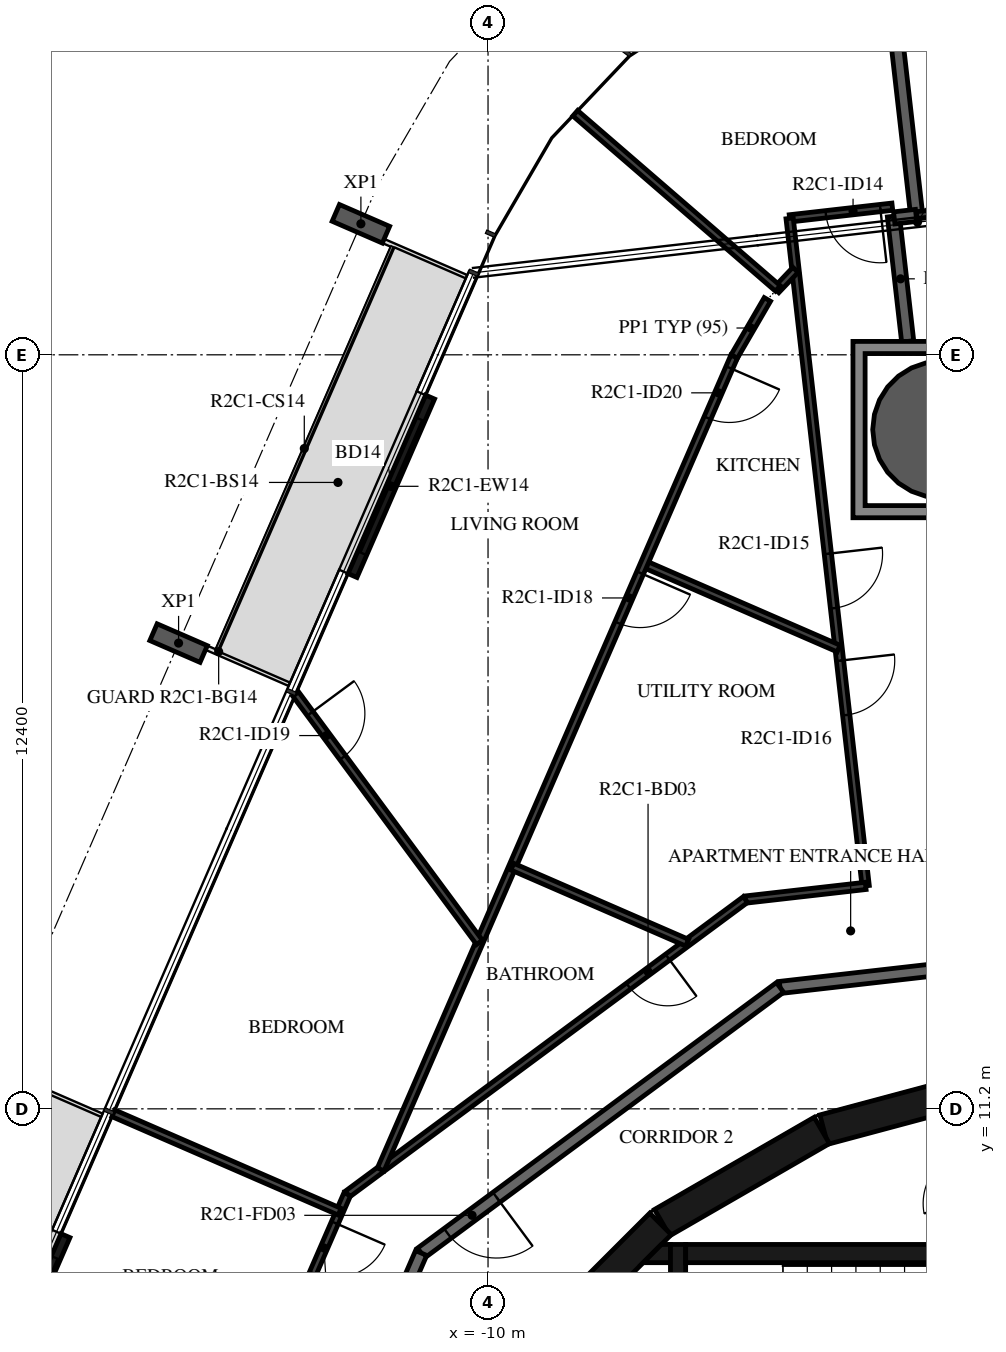
"""IFC4 building model, lengths in metres.
Left out: names, types, materials, properties, quantities, classifications, styles, units other than length and angle.
Written with IfcOpenShell. Run it as: python <this file> out.ifc"""

import sys

from ifc_helpers import new_model, si_unit, direction, frame, frame_2d, origin, origin_2d, place, context, subcontext, project, spatial, polyline, rectangle, hollow_circle, i_section, outline, extrude, element, fill, save


model = new_model("IFC4")
c1 = context("Model", 3, precision=1e-05, world=origin(), true_north=direction((0.0, 1.0)))
c2 = subcontext(c1, "Body", "Model", "MODEL_VIEW")
j1 = project(units=[si_unit("LENGTHUNIT", "METRE"), si_unit("PLANEANGLEUNIT", "RADIAN")], contexts=[c1])
p1 = place(None, origin())
s1 = spatial("IfcSite", under=j1, at=p1, CompositionType="ELEMENT")
p2 = place(p1, origin())
s2 = spatial("IfcBuilding", under=s1, at=p2, CompositionType="ELEMENT")
p3 = place(p2, frame((0.0, 0.0, 101.2)))
s3 = spatial("IfcBuildingStorey", under=s2, at=p3, CompositionType="ELEMENT", Elevation=101.2)
p4 = place(p3, frame((-2.549, 22.37, -0.38), z_axis=(0.0, 0.0, 1.0), x_axis=(1.0, 0.0, 0.0)))
e1 = element("IfcColumn", 1, at=p4, inside=s3, PredefinedType="COLUMN", context=c2, shape_type="SweptSolid", body=[
    extrude(hollow_circle(Radius=1.125, WallThickness=0.055, at=origin_2d()), origin(), (0.0, 0.0, 1.0), 3.5),
])
for number, where, z_axis, x_axis in (
    (2, (-12.091, 25.754, -0.38), (0.0, 0.0, 1.0), (0.399, 0.917, 0.0)),
    (3, (-15.089, 18.859, -0.38), (0.0, 0.0, 1.0), (0.399, 0.917, 0.0)),
):
    element("IfcColumn", number, at=place(p3, frame(where, z_axis=z_axis, x_axis=x_axis)), inside=s3, PredefinedType="COLUMN", context=c2, shape_type="SweptSolid", body=[
        extrude(i_section(OverallWidth=0.3, OverallDepth=0.9, WebThickness=0.019, FlangeThickness=0.035, FilletRadius=0.03, at=origin_2d()), origin(), (0.0, 0.0, 1.0), 3.5),
    ])
p5 = place(p3, frame((-10.953, 22.905, 0.0), z_axis=(0.0, 0.0, 1.0), x_axis=(-0.398784695066, -0.917044582876, 0.0)))
e4 = element("IfcWall", 4, at=p5, inside=s3, PredefinedType="STANDARD", context=c2, shape_type="SweptSolid", body=[
    extrude(rectangle(XDim=3.2, YDim=0.16, at=frame_2d((1.6, 0.0))), origin(), (0.0, 0.0, 1.0), 3.12),
])
p6 = place(p5, frame((0.4, 0.0, 0.0)))
e5 = element("IfcOpeningElement", 5, at=p6, cuts=e4, PredefinedType="OPENING", context=c2, shape_type="SweptSolid", body=[
    extrude(rectangle(XDim=2.4, YDim=2.4, at=frame_2d((1.2, 1.2))), frame((0.0, 0.09, 0.0), z_axis=(0.0, -1.0, 0.0), x_axis=(1.0, 0.0, 0.0)), (0.0, 0.0, 1.0), 0.18),
])
p7 = place(p3, frame((-16.949, 9.114, 0.0), z_axis=(0.0, 0.0, 1.0), x_axis=(-0.398720531764, -0.917072482168, 0.0)))
e6 = element("IfcWall", 6, at=p7, inside=s3, PredefinedType="STANDARD", context=c2, shape_type="SweptSolid", body=[
    extrude(rectangle(XDim=3.2, YDim=0.16, at=frame_2d((1.6, 0.0))), origin(), (0.0, 0.0, 1.0), 3.12),
])
p8 = place(p7, frame((0.4, 0.0, 0.0)))
e7 = element("IfcOpeningElement", 7, at=p8, cuts=e6, PredefinedType="OPENING", context=c2, shape_type="SweptSolid", body=[
    extrude(rectangle(XDim=2.4, YDim=2.4, at=frame_2d((1.2, 1.2))), frame((0.0, 0.09, 0.0), z_axis=(0.0, -1.0, 0.0), x_axis=(1.0, 0.0, 0.0)), (0.0, 0.0, 1.0), 0.18),
])
for number, where, z_axis, x_axis in (
    (8, (-1.55, 11.643, 0.0), (0.0, 0.0, 1.0), (-0.966, -0.259, 0.0)),
    (9, (-4.51, 10.845, 0.0), (0.0, 0.0, 1.0), (-0.866, -0.5, 0.0)),
):
    element("IfcWall", number, at=place(p3, frame(where, z_axis=z_axis, x_axis=x_axis)), inside=s3, PredefinedType="SHEAR", context=c2, shape_type="SweptSolid", body=[
        extrude(rectangle(XDim=3.033, YDim=0.5, at=frame_2d((1.516, 0.0))), origin(), (0.0, 0.0, 1.0), 3.12),
    ])
p9 = place(p3, frame((-7.164, 9.308, 0.0), z_axis=(0.0, 0.0, 1.0), x_axis=(-0.707106781187, -0.707106781187, 0.0)))
e10 = element("IfcWall", 10, at=p9, inside=s3, PredefinedType="SHEAR", context=c2, shape_type="SweptSolid", body=[
    extrude(rectangle(XDim=3.032, YDim=0.5, at=frame_2d((1.516, 0.0))), origin(), (0.0, 0.0, 1.0), 3.12),
])
p10 = place(p9, frame((1.416, 0.0, 0.0)))
e11 = element("IfcOpeningElement", 11, at=p10, cuts=e10, PredefinedType="OPENING", context=c2, shape_type="SweptSolid", body=[
    extrude(rectangle(XDim=1.2, YDim=2.1, at=frame_2d((0.6, 1.05))), frame((0.0, 0.26, 0.0), z_axis=(0.0, -1.0, 0.0), x_axis=(1.0, 0.0, 0.0)), (0.0, 0.0, 1.0), 0.52),
])
p11 = place(p3, frame((-6.75, 8.82, 0.0), z_axis=(0.0, 0.0, 1.0), x_axis=(1.0, 0.0, 0.0)))
e12 = element("IfcWall", 12, at=p11, inside=s3, PredefinedType="SHEAR", context=c2, shape_type="SweptSolid", body=[
    extrude(rectangle(XDim=6.75, YDim=0.3, at=frame_2d((3.375, 0.0))), origin(), (0.0, 0.0, 1.0), 3.12),
])
p12 = place(p3, frame((-6.875, 8.97, 0.0), z_axis=(0.0, 0.0, 1.0), x_axis=(0.0, -1.0, 0.0)))
e13 = element("IfcWall", 13, at=p12, inside=s3, PredefinedType="SHEAR", context=c2, shape_type="SweptSolid", body=[
    extrude(rectangle(XDim=3.92, YDim=0.25, at=frame_2d((1.96, 0.0))), origin(), (0.0, 0.0, 1.0), 3.12),
])
p13 = place(p12, frame((1.61, 0.0, 0.0)))
e14 = element("IfcOpeningElement", 14, at=p13, cuts=e13, PredefinedType="OPENING", context=c2, shape_type="SweptSolid", body=[
    extrude(rectangle(XDim=1.2, YDim=2.1, at=frame_2d((0.6, 1.05))), frame((0.0, 0.135, 0.0), z_axis=(0.0, -1.0, 0.0), x_axis=(1.0, 0.0, 0.0)), (0.0, 0.0, 1.0), 0.27),
])
p14 = place(p3, origin())
e15 = element("IfcWall", 15, at=p14, inside=s3, PredefinedType="SHEAR", context=c2, shape_type="SweptSolid", body=[
    extrude(outline(polyline([(-7.148, 8.97), (-7.0, 8.97), (-7.0, 8.67), (-7.448, 8.67), (-7.148, 8.97)])), origin(), (0.0, 0.0, 1.0), 3.12),
])
p15 = place(p3, frame((2.096, 14.028, 0.0), z_axis=(0.0, 0.0, 1.0), x_axis=(-0.993569170114, -0.113226782163, 0.0)))
e16 = element("IfcWall", 16, at=p15, inside=s3, PredefinedType="STANDARD", context=c2, shape_type="SweptSolid", body=[
    extrude(rectangle(XDim=7.342, YDim=0.2, at=frame_2d((3.671, 0.0))), origin(), (0.0, 0.0, 1.0), 3.12),
])
p16 = place(p3, frame((-5.198, 13.196, 0.0), z_axis=(0.0, 0.0, 1.0), x_axis=(-0.803869883159, -0.594805187394, 0.0)))
e17 = element("IfcWall", 17, at=p16, inside=s3, PredefinedType="STANDARD", context=c2, shape_type="SweptSolid", body=[
    extrude(rectangle(XDim=7.342, YDim=0.2, at=frame_2d((3.671, 0.0))), origin(), (0.0, 0.0, 1.0), 3.12),
])
p17 = place(p16, frame((5.8, 0.0, 0.0)))
e18 = element("IfcOpeningElement", 18, at=p17, cuts=e17, PredefinedType="OPENING", context=c2, shape_type="SweptSolid", body=[
    extrude(rectangle(XDim=1.0, YDim=2.1, at=frame_2d((0.5, 1.05))), frame((0.0, 0.11, 0.0), z_axis=(0.0, -1.0, 0.0), x_axis=(1.0, 0.0, 0.0)), (0.0, 0.0, 1.0), 0.22),
])
p18 = place(p3, frame((-11.1, 8.829, 0.0), z_axis=(0.0, 0.0, 1.0), x_axis=(-0.398741918631, -0.917063183388, 0.0)))
e19 = element("IfcWall", 19, at=p18, inside=s3, PredefinedType="STANDARD", context=c2, shape_type="SweptSolid", body=[
    extrude(rectangle(XDim=7.342, YDim=0.2, at=frame_2d((3.671, 0.0))), origin(), (0.0, 0.0, 1.0), 3.12),
])
p19 = place(p3, frame((-3.448, 30.265, 0.0), z_axis=(0.0, 0.0, 1.0), x_axis=(0.113189797494, -0.993573384176, 0.0)))
e20 = element("IfcWall", 20, at=p19, inside=s3, PredefinedType="STANDARD", context=c2, shape_type="SweptSolid", body=[
    extrude(rectangle(XDim=4.4, YDim=0.2, at=frame_2d((2.2, 0.0))), origin(), (0.0, 0.0, 1.0), 3.12),
])
p20 = place(p3, frame((-3.333, 25.879, 0.0), z_axis=(0.0, 0.0, 1.0), x_axis=(0.113250782095, -0.993566434797, 0.0)))
e21 = element("IfcWall", 21, at=p20, inside=s3, PredefinedType="STANDARD", context=c2, shape_type="SweptSolid", body=[
    extrude(rectangle(XDim=2.072, YDim=0.2, at=frame_2d((1.036, 0.0))), origin(), (0.0, 0.0, 1.0), 3.12),
])
p21 = place(p3, frame((-2.96, 25.892, 0.0), z_axis=(0.0, 0.0, 1.0), x_axis=(-0.993567388358, -0.113242416041, 0.0)))
e22 = element("IfcWall", 22, at=p21, inside=s3, PredefinedType="STANDARD", context=c2, shape_type="SweptSolid", body=[
    extrude(rectangle(XDim=0.362, YDim=0.2, at=frame_2d((0.181, 0.0))), origin(), (0.0, 0.0, 1.0), 3.12),
])
p22 = place(p3, frame((-2.95, 25.893, 0.0), z_axis=(0.0, 0.0, 1.0), x_axis=(0.993519378224, 0.113662857141, 0.0)))
e23 = element("IfcWall", 23, at=p22, inside=s3, PredefinedType="PARTITIONING", context=c2, shape_type="SweptSolid", body=[
    extrude(rectangle(XDim=0.415, YDim=0.12, at=frame_2d((0.207, 0.0))), origin(), (0.0, 0.0, 1.0), 3.12),
])
p23 = place(p3, frame((-3.351, 26.036, 0.0), z_axis=(0.0, 0.0, 1.0), x_axis=(-0.993575191649, -0.113173930474, 0.0)))
e24 = element("IfcWall", 24, at=p23, inside=s3, PredefinedType="PARTITIONING", context=c2, shape_type="SweptSolid", body=[
    extrude(rectangle(XDim=1.7, YDim=0.12, at=frame_2d((0.85, 0.0))), origin(), (0.0, 0.0, 1.0), 3.12),
])
p24 = place(p23, frame((0.2, 0.0, 0.0)))
e25 = element("IfcOpeningElement", 25, at=p24, cuts=e24, PredefinedType="OPENING", context=c2, shape_type="SweptSolid", body=[
    extrude(rectangle(XDim=0.9, YDim=2.1, at=frame_2d((0.45, 1.05))), frame((0.0, 0.07, 0.0), z_axis=(0.0, -1.0, 0.0), x_axis=(1.0, 0.0, 0.0)), (0.0, 0.0, 1.0), 0.14),
])
p25 = place(p3, frame((-5.04, 25.844, 0.0), z_axis=(0.0, 0.0, 1.0), x_axis=(0.1132106553, -0.993571007793, 0.0)))
e26 = element("IfcWall", 26, at=p25, inside=s3, PredefinedType="PARTITIONING", context=c2, shape_type="SweptSolid", body=[
    extrude(rectangle(XDim=11.048, YDim=0.12, at=frame_2d((5.524, 0.0))), origin(), (0.0, 0.0, 1.0), 3.12),
])
p26 = place(p25, frame((5.551, 0.0, 0.0)))
e27 = element("IfcOpeningElement", 27, at=p26, cuts=e26, PredefinedType="OPENING", context=c2, shape_type="SweptSolid", body=[
    extrude(rectangle(XDim=0.9, YDim=2.1, at=frame_2d((0.45, 1.05))), frame((0.0, 0.07, 0.0), z_axis=(0.0, -1.0, 0.0), x_axis=(1.0, 0.0, 0.0)), (0.0, 0.0, 1.0), 0.14),
])
p27 = place(p25, frame((7.32, 0.0, 0.0)))
e28 = element("IfcOpeningElement", 28, at=p27, cuts=e26, PredefinedType="OPENING", context=c2, shape_type="SweptSolid", body=[
    extrude(rectangle(XDim=0.9, YDim=2.1, at=frame_2d((0.45, 1.05))), frame((0.0, 0.07, 0.0), z_axis=(0.0, -1.0, 0.0), x_axis=(1.0, 0.0, 0.0)), (0.0, 0.0, 1.0), 0.14),
])
p28 = place(p3, frame((-3.79, 14.867, 0.0), z_axis=(0.0, 0.0, 1.0), x_axis=(-0.993557948123, -0.113325212204, 0.0)))
e29 = element("IfcWall", 29, at=p28, inside=s3, PredefinedType="PARTITIONING", context=c2, shape_type="SweptSolid", body=[
    extrude(rectangle(XDim=1.991, YDim=0.12, at=frame_2d((0.995, 0.0))), origin(), (0.0, 0.0, 1.0), 3.12),
])
p29 = place(p3, frame((-5.767, 14.641, 0.0), z_axis=(0.0, 0.0, 1.0), x_axis=(-0.803853364238, -0.594827511807, 0.0)))
e30 = element("IfcWall", 30, at=p29, inside=s3, PredefinedType="PARTITIONING", context=c2, shape_type="SweptSolid", body=[
    extrude(rectangle(XDim=8.146, YDim=0.12, at=frame_2d((4.073, 0.0))), origin(), (0.0, 0.0, 1.0), 3.12),
])
p30 = place(p29, frame((1.592, 0.0, 0.0)))
e31 = element("IfcOpeningElement", 31, at=p30, cuts=e30, PredefinedType="OPENING", context=c2, shape_type="SweptSolid", body=[
    extrude(rectangle(XDim=0.8, YDim=2.1, at=frame_2d((0.4, 1.05))), frame((0.0, 0.07, 0.0), z_axis=(0.0, -1.0, 0.0), x_axis=(1.0, 0.0, 0.0)), (0.0, 0.0, 1.0), 0.14),
])
p31 = place(p3, frame((-12.315, 9.796, 0.0), z_axis=(0.0, 0.0, 1.0), x_axis=(-0.398765150511, -0.917053081745, 0.0)))
e32 = element("IfcWall", 32, at=p31, inside=s3, PredefinedType="PARTITIONING", context=c2, shape_type="SweptSolid", body=[
    extrude(rectangle(XDim=4.573, YDim=0.12, at=frame_2d((2.287, 0.0))), origin(), (0.0, 0.0, 1.0), 3.12),
])
p32 = place(p31, frame((0.513, 0.0, 0.0)))
e33 = element("IfcOpeningElement", 33, at=p32, cuts=e32, PredefinedType="OPENING", context=c2, shape_type="SweptSolid", body=[
    extrude(rectangle(XDim=0.9, YDim=2.1, at=frame_2d((0.45, 1.05))), frame((0.0, 0.07, 0.0), z_axis=(0.0, -1.0, 0.0), x_axis=(1.0, 0.0, 0.0)), (0.0, 0.0, 1.0), 0.14),
])
p33 = place(p3, frame((-5.261, 24.663, 0.0), z_axis=(0.0, 0.0, 1.0), x_axis=(0.688346106747, 0.725382407648, 0.0)))
e34 = element("IfcWall", 34, at=p33, inside=s3, PredefinedType="PARTITIONING", context=c2, shape_type="SweptSolid", body=[
    extrude(rectangle(XDim=0.461, YDim=0.12, at=frame_2d((0.231, 0.0))), origin(), (0.0, 0.0, 1.0), 3.12),
])
p34 = place(p3, frame((-8.566, 27.573, 0.0), z_axis=(0.0, 0.0, 1.0), x_axis=(0.756463964606, -0.654035373854, 0.0)))
e35 = element("IfcWall", 35, at=p34, inside=s3, PredefinedType="PARTITIONING", context=c2, shape_type="SweptSolid", body=[
    extrude(rectangle(XDim=4.405, YDim=0.12, at=frame_2d((2.202, 0.0))), origin(), (0.0, 0.0, 1.0), 3.12),
])
p35 = place(p3, frame((-7.435, 20.161, 0.0), z_axis=(0.0, 0.0, 1.0), x_axis=(0.917055599503, -0.398759360291, 0.0)))
e36 = element("IfcWall", 36, at=p35, inside=s3, PredefinedType="PARTITIONING", context=c2, shape_type="SweptSolid", body=[
    extrude(rectangle(XDim=3.49, YDim=0.12, at=frame_2d((1.745, 0.0))), origin(), (0.0, 0.0, 1.0), 3.12),
])
p36 = place(p3, frame((-5.406, 24.51, 0.0), z_axis=(0.0, 0.0, 1.0), x_axis=(-0.502487709822, -0.864584351858, 0.0)))
e37 = element("IfcWall", 37, at=p36, inside=s3, PredefinedType="PARTITIONING", context=c2, shape_type="SweptSolid", body=[
    extrude(rectangle(XDim=1.087, YDim=0.12, at=frame_2d((0.543, 0.0))), origin(), (0.0, 0.0, 1.0), 3.12),
])
p37 = place(p3, frame((-5.952, 23.571, 0.0), z_axis=(0.0, 0.0, 1.0), x_axis=(-0.398745097158, -0.917061801348, 0.0)))
e38 = element("IfcWall", 38, at=p37, inside=s3, PredefinedType="PARTITIONING", context=c2, shape_type="SweptSolid", body=[
    extrude(rectangle(XDim=14.576, YDim=0.12, at=frame_2d((7.288, 0.0))), origin(), (0.0, 0.0, 1.0), 3.12),
])
p38 = place(p37, frame((3.878, 0.0, 0.0)))
e39 = element("IfcOpeningElement", 39, at=p38, cuts=e38, PredefinedType="OPENING", context=c2, shape_type="SweptSolid", body=[
    extrude(rectangle(XDim=0.9, YDim=2.1, at=frame_2d((0.45, 1.05))), frame((0.0, 0.07, 0.0), z_axis=(0.0, -1.0, 0.0), x_axis=(1.0, 0.0, 0.0)), (0.0, 0.0, 1.0), 0.14),
])
p39 = place(p37, frame((0.2, 0.0, 0.0)))
e40 = element("IfcOpeningElement", 40, at=p39, cuts=e38, PredefinedType="OPENING", context=c2, shape_type="SweptSolid", body=[
    extrude(rectangle(XDim=0.9, YDim=2.1, at=frame_2d((0.45, 1.05))), frame((0.0, 0.07, 0.0), z_axis=(0.0, -1.0, 0.0), x_axis=(1.0, 0.0, 0.0)), (0.0, 0.0, 1.0), 0.14),
])
p40 = place(p3, frame((-9.6, 15.182, 0.0), z_axis=(0.0, 0.0, 1.0), x_axis=(0.917073771145, -0.398717567054, 0.0)))
e41 = element("IfcWall", 41, at=p40, inside=s3, PredefinedType="PARTITIONING", context=c2, shape_type="SweptSolid", body=[
    extrude(rectangle(XDim=3.135, YDim=0.12, at=frame_2d((1.567, 0.0))), origin(), (0.0, 0.0, 1.0), 3.12),
])
p41 = place(p3, frame((-13.163, 18.022, 0.0), z_axis=(0.0, 0.0, 1.0), x_axis=(0.594797671626, -0.803875444226, 0.0)))
e42 = element("IfcWall", 42, at=p41, inside=s3, PredefinedType="PARTITIONING", context=c2, shape_type="SweptSolid", body=[
    extrude(rectangle(XDim=5.081, YDim=0.12, at=frame_2d((2.54, 0.0))), origin(), (0.0, 0.0, 1.0), 3.12),
])
p42 = place(p41, frame((0.4, 0.0, 0.0)))
e43 = element("IfcOpeningElement", 43, at=p42, cuts=e42, PredefinedType="OPENING", context=c2, shape_type="SweptSolid", body=[
    extrude(rectangle(XDim=0.9, YDim=2.1, at=frame_2d((0.45, 1.05))), frame((0.0, 0.07, 0.0), z_axis=(0.0, -1.0, 0.0), x_axis=(1.0, 0.0, 0.0)), (0.0, 0.0, 1.0), 0.14),
])
p43 = place(p3, frame((-16.161, 11.126, 0.0), z_axis=(0.0, 0.0, 1.0), x_axis=(0.91705953326, -0.398750313425, 0.0)))
e44 = element("IfcWall", 44, at=p43, inside=s3, PredefinedType="PARTITIONING", context=c2, shape_type="SweptSolid", body=[
    extrude(rectangle(XDim=4.057, YDim=0.12, at=frame_2d((2.029, 0.0))), origin(), (0.0, 0.0, 1.0), 2.73),
])
p44 = place(p3, origin())
e45 = element("IfcWall", 45, at=p44, inside=s3, PredefinedType="STANDARD", context=c2, shape_type="SweptSolid", body=[
    extrude(outline(polyline([(-1.099, 23.82), (-1.099, 20.92), (-3.999, 20.92), (-3.999, 23.82), (-1.099, 23.82)]), holes=[polyline([(-3.799, 21.12), (-1.299, 21.12), (-1.299, 23.62), (-3.799, 23.62), (-3.799, 21.12)])]), origin(), (0.0, 0.0, 1.0), 3.12),
])
p45 = place(p6, origin())
e46 = element("IfcDoor", 46, at=p45, inside=s3, OperationType="DOUBLE_DOOR_SLIDING", PredefinedType="DOOR", context=c2, shape_type="SweptSolid", body=[
    extrude(rectangle(XDim=2.4, YDim=2.4, at=frame_2d((1.2, 1.2))), frame((0.0, 0.025, 0.0), z_axis=(0.0, -1.0, 0.0), x_axis=(1.0, 0.0, 0.0)), (0.0, 0.0, 1.0), 0.05),
])
fill(e5, e46)
p46 = place(p8, origin())
e47 = element("IfcDoor", 47, at=p46, inside=s3, OperationType="DOUBLE_DOOR_SLIDING", PredefinedType="DOOR", context=c2, shape_type="SweptSolid", body=[
    extrude(rectangle(XDim=2.4, YDim=2.4, at=frame_2d((1.2, 1.2))), frame((0.0, 0.025, 0.0), z_axis=(0.0, -1.0, 0.0), x_axis=(1.0, 0.0, 0.0)), (0.0, 0.0, 1.0), 0.05),
])
fill(e7, e47)
p47 = place(p17, origin())
e48 = element("IfcDoor", 48, at=p47, inside=s3, OperationType="SINGLE_SWING_LEFT", PredefinedType="DOOR", context=c2, shape_type="SweptSolid", body=[
    extrude(rectangle(XDim=1.0, YDim=2.1, at=frame_2d((0.5, 1.05))), frame((0.0, 0.025, 0.0), z_axis=(0.0, -1.0, 0.0), x_axis=(1.0, 0.0, 0.0)), (0.0, 0.0, 1.0), 0.05),
])
fill(e18, e48)
p48 = place(p24, origin())
e49 = element("IfcDoor", 49, at=p48, inside=s3, OperationType="SINGLE_SWING_RIGHT", PredefinedType="DOOR", context=c2, shape_type="SweptSolid", body=[
    extrude(rectangle(XDim=0.9, YDim=2.1, at=frame_2d((0.45, 1.05))), frame((0.0, 0.025, 0.0), z_axis=(0.0, -1.0, 0.0), x_axis=(1.0, 0.0, 0.0)), (0.0, 0.0, 1.0), 0.05),
])
fill(e25, e49)
p49 = place(p26, origin())
e50 = element("IfcDoor", 50, at=p49, inside=s3, OperationType="SINGLE_SWING_LEFT", PredefinedType="DOOR", context=c2, shape_type="SweptSolid", body=[
    extrude(rectangle(XDim=0.9, YDim=2.1, at=frame_2d((0.45, 1.05))), frame((0.0, 0.025, 0.0), z_axis=(0.0, -1.0, 0.0), x_axis=(1.0, 0.0, 0.0)), (0.0, 0.0, 1.0), 0.05),
])
fill(e27, e50)
p50 = place(p27, origin())
e51 = element("IfcDoor", 51, at=p50, inside=s3, OperationType="SINGLE_SWING_LEFT", PredefinedType="DOOR", context=c2, shape_type="SweptSolid", body=[
    extrude(rectangle(XDim=0.9, YDim=2.1, at=frame_2d((0.45, 1.05))), frame((0.0, 0.025, 0.0), z_axis=(0.0, -1.0, 0.0), x_axis=(1.0, 0.0, 0.0)), (0.0, 0.0, 1.0), 0.05),
])
fill(e28, e51)
p51 = place(p30, origin())
e52 = element("IfcDoor", 52, at=p51, inside=s3, OperationType="SINGLE_SWING_LEFT", PredefinedType="DOOR", context=c2, shape_type="SweptSolid", body=[
    extrude(rectangle(XDim=0.8, YDim=2.1, at=frame_2d((0.4, 1.05))), frame((0.0, 0.025, 0.0), z_axis=(0.0, -1.0, 0.0), x_axis=(1.0, 0.0, 0.0)), (0.0, 0.0, 1.0), 0.05),
])
fill(e31, e52)
p52 = place(p32, origin())
e53 = element("IfcDoor", 53, at=p52, inside=s3, OperationType="SINGLE_SWING_LEFT", PredefinedType="DOOR", context=c2, shape_type="SweptSolid", body=[
    extrude(rectangle(XDim=0.9, YDim=2.1, at=frame_2d((0.45, 1.05))), frame((0.0, 0.025, 0.0), z_axis=(0.0, -1.0, 0.0), x_axis=(1.0, 0.0, 0.0)), (0.0, 0.0, 1.0), 0.05),
])
fill(e33, e53)
p53 = place(p38, origin())
e54 = element("IfcDoor", 54, at=p53, inside=s3, OperationType="SINGLE_SWING_LEFT", PredefinedType="DOOR", context=c2, shape_type="SweptSolid", body=[
    extrude(rectangle(XDim=0.9, YDim=2.1, at=frame_2d((0.45, 1.05))), frame((0.0, 0.025, 0.0), z_axis=(0.0, -1.0, 0.0), x_axis=(1.0, 0.0, 0.0)), (0.0, 0.0, 1.0), 0.05),
])
fill(e39, e54)
p54 = place(p42, origin())
e55 = element("IfcDoor", 55, at=p54, inside=s3, OperationType="SINGLE_SWING_RIGHT", PredefinedType="DOOR", context=c2, shape_type="SweptSolid", body=[
    extrude(rectangle(XDim=0.9, YDim=2.1, at=frame_2d((0.45, 1.05))), frame((0.0, 0.025, 0.0), z_axis=(0.0, -1.0, 0.0), x_axis=(1.0, 0.0, 0.0)), (0.0, 0.0, 1.0), 0.05),
])
fill(e43, e55)
p55 = place(p39, origin())
e56 = element("IfcDoor", 56, at=p55, inside=s3, OperationType="SINGLE_SWING_RIGHT", PredefinedType="DOOR", context=c2, shape_type="SweptSolid", body=[
    extrude(rectangle(XDim=0.9, YDim=2.1, at=frame_2d((0.45, 1.05))), frame((0.0, 0.025, 0.0), z_axis=(0.0, -1.0, 0.0), x_axis=(1.0, 0.0, 0.0)), (0.0, 0.0, 1.0), 0.05),
])
fill(e40, e56)
save(model, sys.argv[1])
